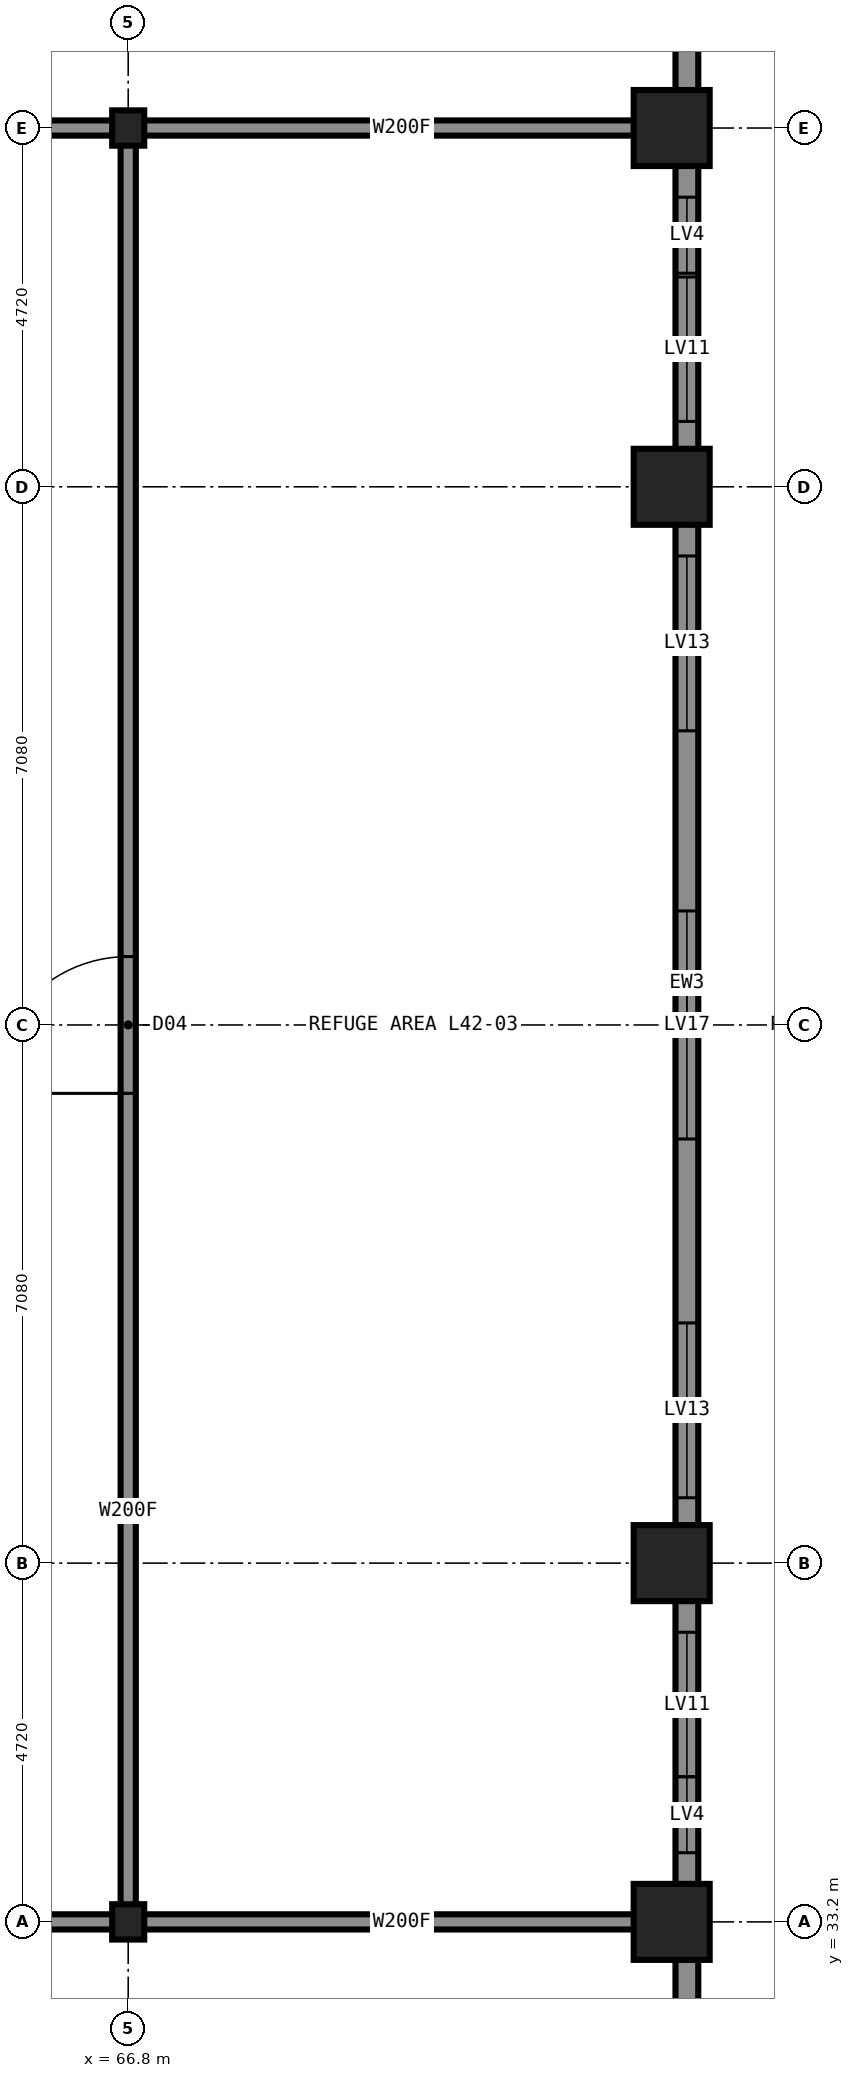
"""IFC4 building model, lengths in metres.
Left out: names, types, materials, properties, quantities, classifications, styles, units other than length and angle.
Written with IfcOpenShell. Run it as: python <this file> out.ifc"""

import sys

from ifc_helpers import new_model, si_unit, direction, frame, frame_2d, origin, origin_2d, place, context, subcontext, project, spatial, rectangle, hollow_rectangle, i_section, extrude, element, fill, save


model = new_model("IFC4")
c1 = context("Model", 3, precision=1e-05, world=origin(), true_north=direction((0.0, 1.0)))
c2 = subcontext(c1, "Body", "Model", "MODEL_VIEW")
j1 = project(units=[si_unit("LENGTHUNIT", "METRE"), si_unit("PLANEANGLEUNIT", "RADIAN")], contexts=[c1])
p1 = place(None, origin())
s1 = spatial("IfcSite", under=j1, at=p1, CompositionType="ELEMENT")
p2 = place(p1, origin())
s2 = spatial("IfcBuilding", under=s1, at=p2, CompositionType="ELEMENT")
p3 = place(p2, frame((0.0, 0.0, 156.4)))
s3 = spatial("IfcBuildingStorey", under=s2, at=p3, CompositionType="ELEMENT", Elevation=156.4)
for number, where, z_axis, x_axis in (
    (1, (73.95, 33.2, 0.0), (0.0, 0.0, 1.0), (1.0, 0.0, 0.0)),
    (2, (73.95, 37.92, 0.0), (0.0, 0.0, 1.0), (1.0, 0.0, 0.0)),
    (3, (73.95, 52.08, 0.0), (0.0, 0.0, 1.0), (1.0, 0.0, 0.0)),
    (4, (73.95, 56.8, 0.0), (0.0, 0.0, 1.0), (1.0, 0.0, 0.0)),
):
    element("IfcColumn", number, at=place(p3, frame(where, z_axis=z_axis, x_axis=x_axis)), inside=s3, PredefinedType="COLUMN", context=c2, shape_type="SweptSolid", body=[
        extrude(hollow_rectangle(XDim=1.0, YDim=1.0, WallThickness=0.06, at=origin_2d()), origin(), (0.0, 0.0, 1.0), 5.4),
    ])
for number, where, z_axis, x_axis in (
    (5, (66.8, 33.2, 0.0), (0.0, 0.0, 1.0), (1.0, 0.0, 0.0)),
    (6, (66.8, 56.8, 0.0), (0.0, 0.0, 1.0), (1.0, 0.0, 0.0)),
):
    element("IfcColumn", number, at=place(p3, frame(where, z_axis=z_axis, x_axis=x_axis)), inside=s3, PredefinedType="COLUMN", context=c2, shape_type="SweptSolid", body=[
        extrude(i_section(OverallWidth=0.422, OverallDepth=0.465, WebThickness=0.045, FlangeThickness=0.073, at=origin_2d()), origin(), (0.0, 0.0, 1.0), 5.4),
    ])
p4 = place(p3, frame((43.2, 33.2, 0.0), z_axis=(0.0, 0.0, 1.0), x_axis=(1.0, 0.0, 0.0)))
e7 = element("IfcWall", 7, at=p4, inside=s3, PredefinedType="PARTITIONING", context=c2, shape_type="SweptSolid", body=[
    extrude(rectangle(XDim=23.6, YDim=0.2, at=frame_2d((11.8, 0.0))), origin(), (0.0, 0.0, 1.0), 5.23),
])
p5 = place(p4, frame((5.3, 0.0, 0.0)))
e8 = element("IfcOpeningElement", 8, at=p5, cuts=e7, PredefinedType="OPENING", context=c2, shape_type="SweptSolid", body=[
    extrude(rectangle(XDim=1.0, YDim=2.1, at=frame_2d((0.5, 1.05))), frame((0.0, 0.11, 0.0), z_axis=(0.0, -1.0, 0.0), x_axis=(1.0, 0.0, 0.0)), (0.0, 0.0, 1.0), 0.22),
])
p6 = place(p3, frame((66.8, 33.2, 0.0), z_axis=(0.0, 0.0, 1.0), x_axis=(1.0, 0.0, 0.0)))
e9 = element("IfcWall", 9, at=p6, inside=s3, PredefinedType="PARTITIONING", context=c2, shape_type="SweptSolid", body=[
    extrude(rectangle(XDim=7.2, YDim=0.2, at=frame_2d((3.6, 0.0))), origin(), (0.0, 0.0, 1.0), 4.473),
])
p7 = place(p3, frame((43.2, 56.8, 0.0), z_axis=(0.0, 0.0, 1.0), x_axis=(1.0, 0.0, 0.0)))
e10 = element("IfcWall", 10, at=p7, inside=s3, PredefinedType="PARTITIONING", context=c2, shape_type="SweptSolid", body=[
    extrude(rectangle(XDim=23.6, YDim=0.2, at=frame_2d((11.8, 0.0))), origin(), (0.0, 0.0, 1.0), 5.23),
])
p8 = place(p7, frame((5.3, 0.0, 0.0)))
e11 = element("IfcOpeningElement", 11, at=p8, cuts=e10, PredefinedType="OPENING", context=c2, shape_type="SweptSolid", body=[
    extrude(rectangle(XDim=1.0, YDim=2.1, at=frame_2d((0.5, 1.05))), frame((0.0, 0.11, 0.0), z_axis=(0.0, -1.0, 0.0), x_axis=(1.0, 0.0, 0.0)), (0.0, 0.0, 1.0), 0.22),
])
p9 = place(p3, frame((66.8, 56.8, 0.0), z_axis=(0.0, 0.0, 1.0), x_axis=(1.0, 0.0, 0.0)))
e12 = element("IfcWall", 12, at=p9, inside=s3, PredefinedType="PARTITIONING", context=c2, shape_type="SweptSolid", body=[
    extrude(rectangle(XDim=7.2, YDim=0.2, at=frame_2d((3.6, 0.0))), origin(), (0.0, 0.0, 1.0), 4.473),
])
p10 = place(p3, frame((66.8, 33.2, 0.0), z_axis=(0.0, 0.0, 1.0), x_axis=(0.0, 1.0, 0.0)))
e13 = element("IfcWall", 13, at=p10, inside=s3, PredefinedType="PARTITIONING", context=c2, shape_type="SweptSolid", body=[
    extrude(rectangle(XDim=23.6, YDim=0.2, at=frame_2d((11.8, 0.0))), origin(), (0.0, 0.0, 1.0), 5.23),
])
p11 = place(p10, frame((10.9, 0.0, 0.0)))
e14 = element("IfcOpeningElement", 14, at=p11, cuts=e13, PredefinedType="OPENING", context=c2, shape_type="SweptSolid", body=[
    extrude(rectangle(XDim=1.8, YDim=2.2, at=frame_2d((0.9, 1.1))), frame((0.0, 0.11, 0.0), z_axis=(0.0, -1.0, 0.0), x_axis=(1.0, 0.0, 0.0)), (0.0, 0.0, 1.0), 0.22),
])
p12 = place(p3, frame((74.15, 31.2, 0.0), z_axis=(0.0, 0.0, 1.0), x_axis=(0.0, 1.0, 0.0)))
e15 = element("IfcWall", 15, at=p12, inside=s3, PredefinedType="SOLIDWALL", context=c2, shape_type="SweptSolid", body=[
    extrude(rectangle(XDim=27.6, YDim=0.3, at=frame_2d((13.8, 0.0))), origin(), (0.0, 0.0, 1.0), 4.43),
])
p13 = place(p12, frame((3.91, 0.0, 2.2)))
e16 = element("IfcOpeningElement", 16, at=p13, cuts=e15, PredefinedType="OPENING", context=c2, shape_type="SweptSolid", body=[
    extrude(rectangle(XDim=1.9, YDim=1.6, at=frame_2d((0.95, 0.8))), frame((0.0, 0.16, 0.0), z_axis=(0.0, -1.0, 0.0), x_axis=(1.0, 0.0, 0.0)), (0.0, 0.0, 1.0), 0.32),
])
p14 = place(p12, frame((7.58, 0.0, 2.15)))
e17 = element("IfcOpeningElement", 17, at=p14, cuts=e15, PredefinedType="OPENING", context=c2, shape_type="SweptSolid", body=[
    extrude(rectangle(XDim=2.3, YDim=1.6, at=frame_2d((1.15, 0.8))), frame((0.0, 0.16, 0.0), z_axis=(0.0, -1.0, 0.0), x_axis=(1.0, 0.0, 0.0)), (0.0, 0.0, 1.0), 0.32),
])
p15 = place(p12, frame((12.3, 0.0, 0.6)))
e18 = element("IfcOpeningElement", 18, at=p15, cuts=e15, PredefinedType="OPENING", context=c2, shape_type="SweptSolid", body=[
    extrude(rectangle(XDim=3.0, YDim=2.1, at=frame_2d((1.5, 1.05))), frame((0.0, 0.16, 0.0), z_axis=(0.0, -1.0, 0.0), x_axis=(1.0, 0.0, 0.0)), (0.0, 0.0, 1.0), 0.32),
])
p16 = place(p12, frame((17.67, 0.0, 2.15)))
e19 = element("IfcOpeningElement", 19, at=p16, cuts=e15, PredefinedType="OPENING", context=c2, shape_type="SweptSolid", body=[
    extrude(rectangle(XDim=2.3, YDim=1.6, at=frame_2d((1.15, 0.8))), frame((0.0, 0.16, 0.0), z_axis=(0.0, -1.0, 0.0), x_axis=(1.0, 0.0, 0.0)), (0.0, 0.0, 1.0), 0.32),
])
p17 = place(p12, frame((21.74, 0.0, 2.2)))
e20 = element("IfcOpeningElement", 20, at=p17, cuts=e15, PredefinedType="OPENING", context=c2, shape_type="SweptSolid", body=[
    extrude(rectangle(XDim=1.9, YDim=1.6, at=frame_2d((0.95, 0.8))), frame((0.0, 0.16, 0.0), z_axis=(0.0, -1.0, 0.0), x_axis=(1.0, 0.0, 0.0)), (0.0, 0.0, 1.0), 0.32),
])
p18 = place(p12, frame((2.91, 0.0, 2.95)))
e21 = element("IfcOpeningElement", 21, at=p18, cuts=e15, PredefinedType="OPENING", context=c2, shape_type="SweptSolid", body=[
    extrude(rectangle(XDim=1.0, YDim=0.8, at=frame_2d((0.5, 0.4))), frame((0.0, 0.16, 0.0), z_axis=(0.0, -1.0, 0.0), x_axis=(1.0, 0.0, 0.0)), (0.0, 0.0, 1.0), 0.32),
])
p19 = place(p12, frame((23.69, 0.0, 2.95)))
e22 = element("IfcOpeningElement", 22, at=p19, cuts=e15, PredefinedType="OPENING", context=c2, shape_type="SweptSolid", body=[
    extrude(rectangle(XDim=1.0, YDim=0.8, at=frame_2d((0.5, 0.4))), frame((0.0, 0.16, 0.0), z_axis=(0.0, -1.0, 0.0), x_axis=(1.0, 0.0, 0.0)), (0.0, 0.0, 1.0), 0.32),
])
p20 = place(p11, origin())
e23 = element("IfcDoor", 23, at=p20, inside=s3, OperationType="DOUBLE_DOOR_SINGLE_SWING", PredefinedType="DOOR", context=c2, shape_type="SweptSolid", body=[
    extrude(rectangle(XDim=1.8, YDim=2.2, at=frame_2d((0.9, 1.1))), frame((0.0, 0.025, 0.0), z_axis=(0.0, -1.0, 0.0), x_axis=(1.0, 0.0, 0.0)), (0.0, 0.0, 1.0), 0.05),
])
fill(e14, e23)
p21 = place(p13, origin())
e24 = element("IfcWindow", 24, at=p21, inside=s3, PartitioningType="SINGLE_PANEL", PredefinedType="USERDEFINED", context=c2, shape_type="SweptSolid", body=[
    extrude(rectangle(XDim=1.9, YDim=1.6, at=frame_2d((0.95, 0.8))), frame((0.0, 0.03, 0.0), z_axis=(0.0, -1.0, 0.0), x_axis=(1.0, 0.0, 0.0)), (0.0, 0.0, 1.0), 0.06),
])
fill(e16, e24)
p22 = place(p14, origin())
e25 = element("IfcWindow", 25, at=p22, inside=s3, PartitioningType="SINGLE_PANEL", PredefinedType="USERDEFINED", context=c2, shape_type="SweptSolid", body=[
    extrude(rectangle(XDim=2.3, YDim=1.6, at=frame_2d((1.15, 0.8))), frame((0.0, 0.03, 0.0), z_axis=(0.0, -1.0, 0.0), x_axis=(1.0, 0.0, 0.0)), (0.0, 0.0, 1.0), 0.06),
])
fill(e17, e25)
p23 = place(p15, origin())
e26 = element("IfcWindow", 26, at=p23, inside=s3, PartitioningType="SINGLE_PANEL", PredefinedType="USERDEFINED", context=c2, shape_type="SweptSolid", body=[
    extrude(rectangle(XDim=3.0, YDim=2.1, at=frame_2d((1.5, 1.05))), frame((0.0, 0.03, 0.0), z_axis=(0.0, -1.0, 0.0), x_axis=(1.0, 0.0, 0.0)), (0.0, 0.0, 1.0), 0.06),
])
fill(e18, e26)
p24 = place(p16, origin())
e27 = element("IfcWindow", 27, at=p24, inside=s3, PartitioningType="SINGLE_PANEL", PredefinedType="USERDEFINED", context=c2, shape_type="SweptSolid", body=[
    extrude(rectangle(XDim=2.3, YDim=1.6, at=frame_2d((1.15, 0.8))), frame((0.0, 0.03, 0.0), z_axis=(0.0, -1.0, 0.0), x_axis=(1.0, 0.0, 0.0)), (0.0, 0.0, 1.0), 0.06),
])
fill(e19, e27)
p25 = place(p17, origin())
e28 = element("IfcWindow", 28, at=p25, inside=s3, PartitioningType="SINGLE_PANEL", PredefinedType="USERDEFINED", context=c2, shape_type="SweptSolid", body=[
    extrude(rectangle(XDim=1.9, YDim=1.6, at=frame_2d((0.95, 0.8))), frame((0.0, 0.03, 0.0), z_axis=(0.0, -1.0, 0.0), x_axis=(1.0, 0.0, 0.0)), (0.0, 0.0, 1.0), 0.06),
])
fill(e20, e28)
p26 = place(p18, origin())
e29 = element("IfcWindow", 29, at=p26, inside=s3, PartitioningType="SINGLE_PANEL", PredefinedType="USERDEFINED", context=c2, shape_type="SweptSolid", body=[
    extrude(rectangle(XDim=1.0, YDim=0.8, at=frame_2d((0.5, 0.4))), frame((0.0, 0.03, 0.0), z_axis=(0.0, -1.0, 0.0), x_axis=(1.0, 0.0, 0.0)), (0.0, 0.0, 1.0), 0.06),
])
fill(e21, e29)
p27 = place(p19, origin())
e30 = element("IfcWindow", 30, at=p27, inside=s3, PartitioningType="SINGLE_PANEL", PredefinedType="USERDEFINED", context=c2, shape_type="SweptSolid", body=[
    extrude(rectangle(XDim=1.0, YDim=0.8, at=frame_2d((0.5, 0.4))), frame((0.0, 0.03, 0.0), z_axis=(0.0, -1.0, 0.0), x_axis=(1.0, 0.0, 0.0)), (0.0, 0.0, 1.0), 0.06),
])
fill(e22, e30)
save(model, sys.argv[1])
